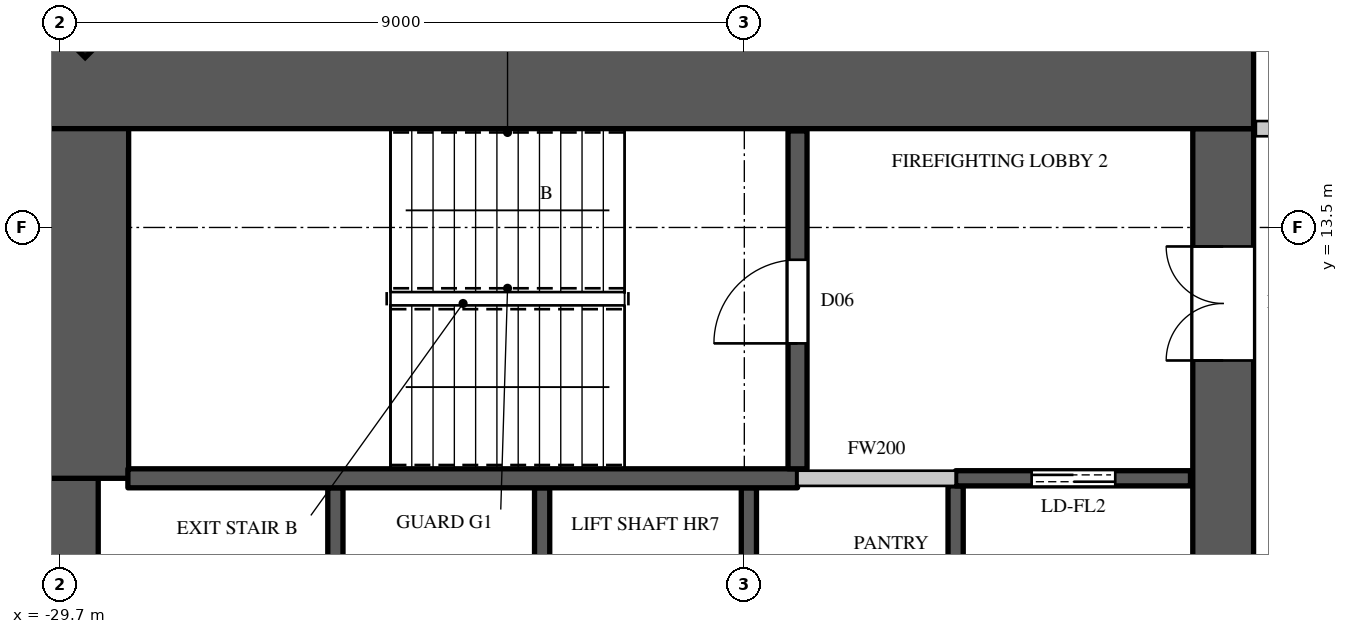
"""IFC4 building model, lengths in metres.
Left out: names, types, materials, properties, quantities, classifications, styles, units other than length and angle.
Written with IfcOpenShell. Run it as: python <this file> out.ifc"""

import sys

from ifc_helpers import new_model, si_unit, direction, frame, frame_2d, origin, origin_2d, place, context, subcontext, project, spatial, rectangle, extrude, element, fill, save


model = new_model("IFC4")
c1 = context("Model", 3, precision=1e-05, world=origin(), true_north=direction((0.0, 1.0)))
c2 = subcontext(c1, "Body", "Model", "MODEL_VIEW")
j1 = project(units=[si_unit("LENGTHUNIT", "METRE"), si_unit("PLANEANGLEUNIT", "RADIAN")], contexts=[c1])
p1 = place(None, origin())
s1 = spatial("IfcSite", under=j1, at=p1, CompositionType="ELEMENT")
p2 = place(p1, origin())
s2 = spatial("IfcBuilding", under=s1, at=p2, CompositionType="ELEMENT")
p3 = place(p2, frame((0.0, 0.0, 164.6)))
s3 = spatial("IfcBuildingStorey", under=s2, at=p3, CompositionType="ELEMENT", Elevation=164.6)
p4 = place(p3, frame((-29.443, 16.443, 0.0), z_axis=(0.0, 0.0, 1.0), x_axis=(-0.707106781187, -0.707106781187, 0.0)))
e1 = element("IfcColumn", 1, at=p4, inside=s3, PredefinedType="COLUMN", context=c2, shape_type="SweptSolid", body=[
    extrude(rectangle(XDim=0.9, YDim=1.1, at=origin_2d()), origin(), (0.0, 0.0, 1.0), 4.1),
])
p5 = place(p3, frame((-30.0, 15.4, 0.0), z_axis=(0.0, 0.0, 1.0), x_axis=(1.0, 0.0, 0.0)))
e2 = element("IfcWall", 2, at=p5, inside=s3, PredefinedType="SHEAR", context=c2, shape_type="SweptSolid", body=[
    extrude(rectangle(XDim=16.0, YDim=1.2, at=frame_2d((8.0, 0.0))), origin(), (0.0, 0.0, 1.0), 4.1),
])
p6 = place(p3, frame((-14.4, -14.8, 0.0), z_axis=(0.0, 0.0, 1.0), x_axis=(0.0, 1.0, 0.0)))
e3 = element("IfcWall", 3, at=p6, inside=s3, PredefinedType="SHEAR", context=c2, shape_type="SweptSolid", body=[
    extrude(rectangle(XDim=29.6, YDim=0.8, at=frame_2d((14.8, 0.0))), origin(), (0.0, 0.0, 1.0), 4.1),
])
p7 = place(p6, frame((1.55, 0.0, 0.0)))
e4 = element("IfcOpeningElement", 4, at=p7, cuts=e3, PredefinedType="OPENING", context=c2, shape_type="SweptSolid", body=[
    extrude(rectangle(XDim=1.5, YDim=2.4, at=frame_2d((0.75, 1.2))), frame((0.0, 0.41, 0.0), z_axis=(0.0, -1.0, 0.0), x_axis=(1.0, 0.0, 0.0)), (0.0, 0.0, 1.0), 0.82),
])
p8 = place(p6, frame((26.55, 0.0, 0.0)))
e5 = element("IfcOpeningElement", 5, at=p8, cuts=e3, PredefinedType="OPENING", context=c2, shape_type="SweptSolid", body=[
    extrude(rectangle(XDim=1.5, YDim=2.4, at=frame_2d((0.75, 1.2))), frame((0.0, 0.41, 0.0), z_axis=(0.0, -1.0, 0.0), x_axis=(1.0, 0.0, 0.0)), (0.0, 0.0, 1.0), 0.82),
])
p9 = place(p6, frame((8.45, 0.0, 0.0)))
e6 = element("IfcOpeningElement", 6, at=p9, cuts=e3, PredefinedType="OPENING", context=c2, shape_type="SweptSolid", body=[
    extrude(rectangle(XDim=1.5, YDim=2.4, at=frame_2d((0.75, 1.2))), frame((0.0, 0.41, 0.0), z_axis=(0.0, -1.0, 0.0), x_axis=(1.0, 0.0, 0.0)), (0.0, 0.0, 1.0), 0.82),
])
p10 = place(p6, frame((19.65, 0.0, 0.0)))
e7 = element("IfcOpeningElement", 7, at=p10, cuts=e3, PredefinedType="OPENING", context=c2, shape_type="SweptSolid", body=[
    extrude(rectangle(XDim=1.5, YDim=2.4, at=frame_2d((0.75, 1.2))), frame((0.0, 0.41, 0.0), z_axis=(0.0, -1.0, 0.0), x_axis=(1.0, 0.0, 0.0)), (0.0, 0.0, 1.0), 0.82),
])
p11 = place(p6, frame((14.5, 0.0, 0.0)))
e8 = element("IfcOpeningElement", 8, at=p11, cuts=e3, PredefinedType="OPENING", context=c2, shape_type="SweptSolid", body=[
    extrude(rectangle(XDim=0.6, YDim=2.0, at=frame_2d((0.3, 1.0))), frame((0.0, 0.41, 0.0), z_axis=(0.0, -1.0, 0.0), x_axis=(1.0, 0.0, 0.0)), (0.0, 0.0, 1.0), 0.82),
])
p12 = place(p3, frame((-29.6, -10.2, 0.0), z_axis=(0.0, 0.0, 1.0), x_axis=(0.0, 1.0, 0.0)))
e9 = element("IfcWall", 9, at=p12, inside=s3, PredefinedType="SHEAR", context=c2, shape_type="SweptSolid", body=[
    extrude(rectangle(XDim=20.4, YDim=0.8, at=frame_2d((10.2, 0.0))), origin(), (0.0, 0.0, 1.0), 4.1),
])
p13 = place(p3, frame((-29.4, 10.2, 0.0), z_axis=(0.0, 0.0, 1.0), x_axis=(0.0, 1.0, 0.0)))
e10 = element("IfcWall", 10, at=p13, inside=s3, PredefinedType="SHEAR", context=c2, shape_type="SweptSolid", body=[
    extrude(rectangle(XDim=4.6, YDim=1.2, at=frame_2d((2.3, 0.0))), origin(), (0.0, 0.0, 1.0), 4.1),
])
p14 = place(p3, frame((-20.0, 10.2, 0.0), z_axis=(0.0, 0.0, 1.0), x_axis=(1.0, 0.0, 0.0)))
e11 = element("IfcWall", 11, at=p14, inside=s3, PredefinedType="PARTITIONING", context=c2, shape_type="SweptSolid", body=[
    extrude(rectangle(XDim=2.08, YDim=0.2, at=frame_2d((1.04, 0.0))), origin(), (0.0, 0.0, 1.0), 3.8),
])
p15 = place(p3, frame((-13.97, 14.8, 0.0), z_axis=(0.0, 0.0, 1.0), x_axis=(1.0, 0.0, 0.0)))
e12 = element("IfcWall", 12, at=p15, inside=s3, PredefinedType="PARTITIONING", context=c2, shape_type="SweptSolid", body=[
    extrude(rectangle(XDim=2.87, YDim=0.2, at=frame_2d((1.435, 0.0))), origin(), (0.0, 0.0, 1.0), 3.8),
])
for number, where, z_axis, x_axis in (
    (13, (-26.08, 7.5, 0.0), (0.0, 0.0, 1.0), (0.0, 1.0, 0.0)),
    (14, (-23.36, 7.5, 0.0), (0.0, 0.0, 1.0), (0.0, 1.0, 0.0)),
):
    element("IfcWall", number, at=place(p3, frame(where, z_axis=z_axis, x_axis=x_axis)), inside=s3, PredefinedType="SHEAR", context=c2, shape_type="SweptSolid", body=[
        extrude(rectangle(XDim=2.575, YDim=0.2, at=frame_2d((1.288, 0.0))), origin(), (0.0, 0.0, 1.0), 4.1),
    ])
p16 = place(p3, frame((-20.64, 7.5, 0.0), z_axis=(0.0, 0.0, 1.0), x_axis=(0.0, 1.0, 0.0)))
e15 = element("IfcWall", 15, at=p16, inside=s3, PredefinedType="SHEAR", context=c2, shape_type="SweptSolid", body=[
    extrude(rectangle(XDim=2.575, YDim=0.2, at=frame_2d((1.288, 0.0))), origin(), (0.0, 0.0, 1.0), 3.8),
])
p17 = place(p3, frame((-17.92, 7.5, 0.0), z_axis=(0.0, 0.0, 1.0), x_axis=(0.0, 1.0, 0.0)))
e16 = element("IfcWall", 16, at=p17, inside=s3, PredefinedType="SHEAR", context=c2, shape_type="SweptSolid", body=[
    extrude(rectangle(XDim=2.6, YDim=0.2, at=frame_2d((1.3, 0.0))), origin(), (0.0, 0.0, 1.0), 3.8),
])
p18 = place(p3, frame((-17.92, 10.2, 0.0), z_axis=(0.0, 0.0, 1.0), x_axis=(1.0, 0.0, 0.0)))
e17 = element("IfcWall", 17, at=p18, inside=s3, PredefinedType="SHEAR", context=c2, shape_type="SweptSolid", body=[
    extrude(rectangle(XDim=3.09, YDim=0.2, at=frame_2d((1.545, 0.0))), origin(), (0.0, 0.0, 1.0), 3.8),
])
p19 = place(p18, frame((1.0, 0.0, 0.0)))
e18 = element("IfcOpeningElement", 18, at=p19, cuts=e17, PredefinedType="OPENING", context=c2, shape_type="SweptSolid", body=[
    extrude(rectangle(XDim=1.1, YDim=2.2, at=frame_2d((0.55, 1.1))), frame((0.0, 0.11, 0.0), z_axis=(0.0, -1.0, 0.0), x_axis=(1.0, 0.0, 0.0)), (0.0, 0.0, 1.0), 0.22),
])
p20 = place(p3, frame((-28.81, 10.2, 0.0), z_axis=(0.0, 0.0, 1.0), x_axis=(1.0, 0.0, 0.0)))
e19 = element("IfcWall", 19, at=p20, inside=s3, PredefinedType="SHEAR", context=c2, shape_type="SweptSolid", body=[
    extrude(rectangle(XDim=8.81, YDim=0.25, at=frame_2d((4.405, 0.0))), origin(), (0.0, 0.0, 1.0), 3.8),
])
p21 = place(p3, frame((-20.0, 10.325, 0.0), z_axis=(0.0, 0.0, 1.0), x_axis=(0.0, 1.0, 0.0)))
e20 = element("IfcWall", 20, at=p21, inside=s3, PredefinedType="SHEAR", context=c2, shape_type="SweptSolid", body=[
    extrude(rectangle(XDim=4.445, YDim=0.25, at=frame_2d((2.223, 0.0))), origin(), (0.0, 0.0, 1.0), 3.8),
])
p22 = place(p21, frame((1.65, 0.0, 0.0)))
e21 = element("IfcOpeningElement", 21, at=p22, cuts=e20, PredefinedType="OPENING", context=c2, shape_type="SweptSolid", body=[
    extrude(rectangle(XDim=1.1, YDim=2.2, at=frame_2d((0.55, 1.1))), frame((0.0, 0.135, 0.0), z_axis=(0.0, -1.0, 0.0), x_axis=(1.0, 0.0, 0.0)), (0.0, 0.0, 1.0), 0.27),
])
p23 = place(p22, origin())
e22 = element("IfcDoor", 22, at=p23, inside=s3, OperationType="SINGLE_SWING_LEFT", PredefinedType="DOOR", context=c2, shape_type="SweptSolid", body=[
    extrude(rectangle(XDim=1.1, YDim=2.2, at=frame_2d((0.55, 1.1))), frame((0.0, 0.025, 0.0), z_axis=(0.0, -1.0, 0.0), x_axis=(1.0, 0.0, 0.0)), (0.0, 0.0, 1.0), 0.05),
])
fill(e21, e22)
p24 = place(p19, origin())
e23 = element("IfcDoor", 23, at=p24, inside=s3, OperationType="DOUBLE_DOOR_SLIDING", PredefinedType="DOOR", context=c2, shape_type="SweptSolid", body=[
    extrude(rectangle(XDim=1.1, YDim=2.2, at=frame_2d((0.55, 1.1))), frame((0.0, 0.025, 0.0), z_axis=(0.0, -1.0, 0.0), x_axis=(1.0, 0.0, 0.0)), (0.0, 0.0, 1.0), 0.05),
])
fill(e18, e23)
p25 = place(p8, origin())
e24 = element("IfcDoor", 24, at=p25, inside=s3, OperationType="DOUBLE_DOOR_SINGLE_SWING", PredefinedType="DOOR", context=c2, shape_type="SweptSolid", body=[
    extrude(rectangle(XDim=1.5, YDim=2.4, at=frame_2d((0.75, 1.2))), frame((0.0, 0.395, 0.0), z_axis=(0.0, -1.0, 0.0), x_axis=(1.0, 0.0, 0.0)), (0.0, 0.0, 1.0), 0.05),
])
fill(e5, e24)
save(model, sys.argv[1])
